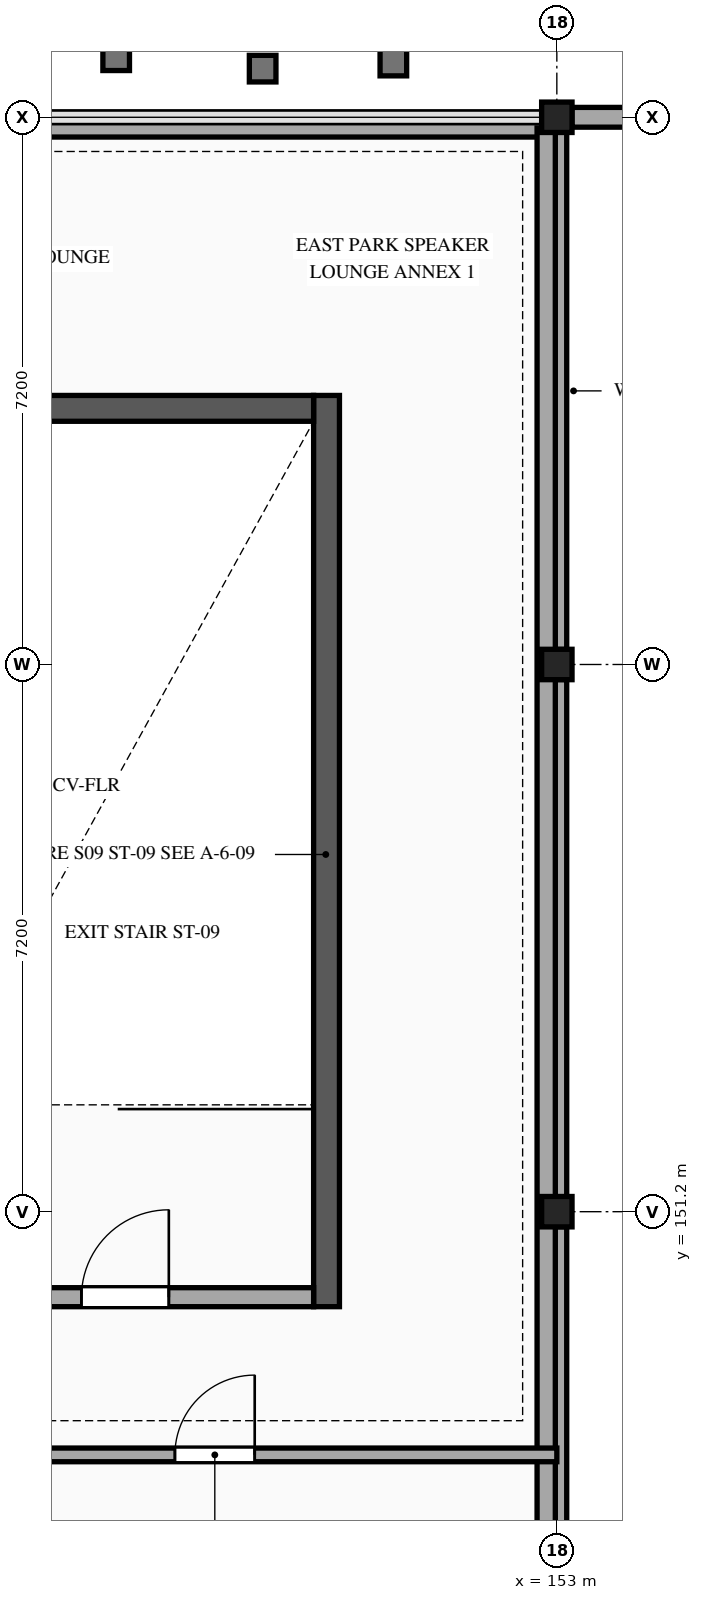
"""IFC4 building model, lengths in metres.
Left out: names, types, materials, properties, quantities, classifications, styles, units other than length and angle.
Written with IfcOpenShell. Run it as: python <this file> out.ifc"""

import sys

from ifc_helpers import new_model, si_unit, direction, frame, frame_2d, origin, origin_2d, place, context, subcontext, project, spatial, rectangle, hollow_rectangle, extrude, element, fill, save


model = new_model("IFC4")
c1 = context("Model", 3, precision=1e-05, world=origin(), true_north=direction((0.0, 1.0)))
c2 = subcontext(c1, "Body", "Model", "MODEL_VIEW")
j1 = project(units=[si_unit("LENGTHUNIT", "METRE"), si_unit("PLANEANGLEUNIT", "RADIAN")], contexts=[c1])
p1 = place(None, origin())
s1 = spatial("IfcSite", under=j1, at=p1, CompositionType="ELEMENT")
p2 = place(p1, origin())
s2 = spatial("IfcBuilding", under=s1, at=p2, CompositionType="ELEMENT")
p3 = place(p2, frame((0.0, 0.0, 15.3)))
s3 = spatial("IfcBuildingStorey", under=s2, at=p3, CompositionType="ELEMENT", Elevation=15.3)
for number, where, z_axis, x_axis in (
    (1, (153.0, 151.2, 0.0), (0.0, 0.0, 1.0), (1.0, 0.0, 0.0)),
    (2, (153.0, 158.4, 0.0), (0.0, 0.0, 1.0), (1.0, 0.0, 0.0)),
    (3, (153.0, 165.6, 0.0), (0.0, 0.0, 1.0), (1.0, 0.0, 0.0)),
):
    element("IfcColumn", number, at=place(p3, frame(where, z_axis=z_axis, x_axis=x_axis)), inside=s3, PredefinedType="COLUMN", context=c2, shape_type="SweptSolid", body=[
        extrude(hollow_rectangle(XDim=0.4, YDim=0.4, WallThickness=0.016, at=origin_2d()), origin(), (0.0, 0.0, 1.0), 4.5),
    ])
p4 = place(p3, frame((149.97, 161.94, 0.0), z_axis=(0.0, 0.0, 1.0), x_axis=(0.0, -1.0, 0.0)))
e4 = element("IfcWall", 4, at=p4, inside=s3, PredefinedType="SHEAR", context=c2, shape_type="SweptSolid", body=[
    extrude(rectangle(XDim=11.99, YDim=0.34, at=frame_2d((5.995, 0.0))), origin(), (0.0, 0.0, 1.0), 4.26),
])
p5 = place(p3, frame((144.84, 161.77, 0.0), z_axis=(0.0, 0.0, 1.0), x_axis=(1.0, 0.0, 0.0)))
e5 = element("IfcWall", 5, at=p5, inside=s3, PredefinedType="SHEAR", context=c2, shape_type="SweptSolid", body=[
    extrude(rectangle(XDim=4.96, YDim=0.34, at=frame_2d((2.48, 0.0))), origin(), (0.0, 0.0, 1.0), 4.26),
])
p6 = place(p3, frame((153.0, 165.402, 0.0), z_axis=(0.0, 0.0, 1.0), x_axis=(0.0, -1.0, 0.0)))
e6 = element("IfcWall", 6, at=p6, inside=s3, PredefinedType="STANDARD", context=c2, shape_type="SweptSolid", body=[
    extrude(rectangle(XDim=6.804, YDim=0.26, at=frame_2d((3.402, 0.0))), origin(), (0.0, 0.0, 1.0), 3.239),
])
p7 = place(p3, frame((153.0, 158.202, 0.0), z_axis=(0.0, 0.0, 1.0), x_axis=(0.0, -1.0, 0.0)))
e7 = element("IfcWall", 7, at=p7, inside=s3, PredefinedType="STANDARD", context=c2, shape_type="SweptSolid", body=[
    extrude(rectangle(XDim=6.804, YDim=0.26, at=frame_2d((3.402, 0.0))), origin(), (0.0, 0.0, 1.0), 4.01),
])
p8 = place(p3, frame((153.0, 151.002, 0.0), z_axis=(0.0, 0.0, 1.0), x_axis=(0.0, -1.0, 0.0)))
e8 = element("IfcWall", 8, at=p8, inside=s3, PredefinedType="STANDARD", context=c2, shape_type="SweptSolid", body=[
    extrude(rectangle(XDim=6.804, YDim=0.26, at=frame_2d((3.402, 0.0))), origin(), (0.0, 0.0, 1.0), 3.648),
])
p9 = place(p3, frame((153.198, 165.6, 0.0), z_axis=(0.0, 0.0, 1.0), x_axis=(1.0, 0.0, 0.0)))
e9 = element("IfcWall", 9, at=p9, inside=s3, PredefinedType="STANDARD", context=c2, shape_type="SweptSolid", body=[
    extrude(rectangle(XDim=8.604, YDim=0.26, at=frame_2d((4.302, 0.0))), origin(), (0.0, 0.0, 1.0), 3.239),
])
p10 = place(p3, frame((99.14, 165.46, 4.5), z_axis=(0.0, 0.0, 1.0), x_axis=(1.0, 0.0, 0.0)))
e10 = element("IfcWall", 10, at=p10, inside=s3, PredefinedType="PARAPET", context=c2, shape_type="SweptSolid", body=[
    extrude(rectangle(XDim=53.72, YDim=0.24, at=frame_2d((26.86, 0.0))), origin(), (0.0, 0.0, 1.0), 0.65),
])
p11 = place(p3, frame((152.86, 165.46, 4.5), z_axis=(0.0, 0.0, 1.0), x_axis=(0.0, -1.0, 0.0)))
e11 = element("IfcWall", 11, at=p11, inside=s3, PredefinedType="PARAPET", context=c2, shape_type="SweptSolid", body=[
    extrude(rectangle(XDim=42.92, YDim=0.24, at=frame_2d((21.46, 0.0))), origin(), (0.0, 0.0, 1.0), 0.65),
])
p12 = place(p3, frame((144.84, 150.075, 0.0), z_axis=(0.0, 0.0, 1.0), x_axis=(1.0, 0.0, 0.0)))
e12 = element("IfcWall", 12, at=p12, inside=s3, PredefinedType="STANDARD", context=c2, shape_type="SweptSolid", body=[
    extrude(rectangle(XDim=4.96, YDim=0.25, at=frame_2d((2.48, 0.0))), origin(), (0.0, 0.0, 1.0), 4.25),
])
p13 = place(p12, frame((1.905, 0.0, 0.0)))
e13 = element("IfcOpeningElement", 13, at=p13, cuts=e12, PredefinedType="OPENING", context=c2, shape_type="SweptSolid", body=[
    extrude(rectangle(XDim=1.15, YDim=2.2, at=frame_2d((0.575, 1.1))), frame((0.0, 0.135, 0.0), z_axis=(0.0, -1.0, 0.0), x_axis=(1.0, 0.0, 0.0)), (0.0, 0.0, 1.0), 0.27),
])
p14 = place(p3, frame((144.0, 148.0, 0.0), z_axis=(0.0, 0.0, 1.0), x_axis=(1.0, 0.0, 0.0)))
e14 = element("IfcWall", 14, at=p14, inside=s3, PredefinedType="PARTITIONING", context=c2, shape_type="SweptSolid", body=[
    extrude(rectangle(XDim=9.0, YDim=0.18, at=frame_2d((4.5, 0.0))), origin(), (0.0, 0.0, 1.0), 3.648),
])
p15 = place(p14, frame((3.975, 0.0, 0.0)))
e15 = element("IfcOpeningElement", 15, at=p15, cuts=e14, PredefinedType="OPENING", context=c2, shape_type="SweptSolid", body=[
    extrude(rectangle(XDim=1.05, YDim=2.15, at=frame_2d((0.525, 1.075))), frame((0.0, 0.1, 0.0), z_axis=(0.0, -1.0, 0.0), x_axis=(1.0, 0.0, 0.0)), (0.0, 0.0, 1.0), 0.2),
])
p16 = place(p13, origin())
e16 = element("IfcDoor", 16, at=p16, inside=s3, OperationType="SINGLE_SWING_RIGHT", PredefinedType="DOOR", context=c2, shape_type="SweptSolid", body=[
    extrude(rectangle(XDim=1.15, YDim=2.2, at=frame_2d((0.575, 1.1))), frame((0.0, 0.025, 0.0), z_axis=(0.0, -1.0, 0.0), x_axis=(1.0, 0.0, 0.0)), (0.0, 0.0, 1.0), 0.05),
])
fill(e13, e16)
p17 = place(p15, origin())
e17 = element("IfcDoor", 17, at=p17, inside=s3, OperationType="SINGLE_SWING_RIGHT", PredefinedType="DOOR", context=c2, shape_type="SweptSolid", body=[
    extrude(rectangle(XDim=1.05, YDim=2.15, at=frame_2d((0.525, 1.075))), frame((0.0, 0.025, 0.0), z_axis=(0.0, -1.0, 0.0), x_axis=(1.0, 0.0, 0.0)), (0.0, 0.0, 1.0), 0.05),
])
fill(e15, e17)
save(model, sys.argv[1])
